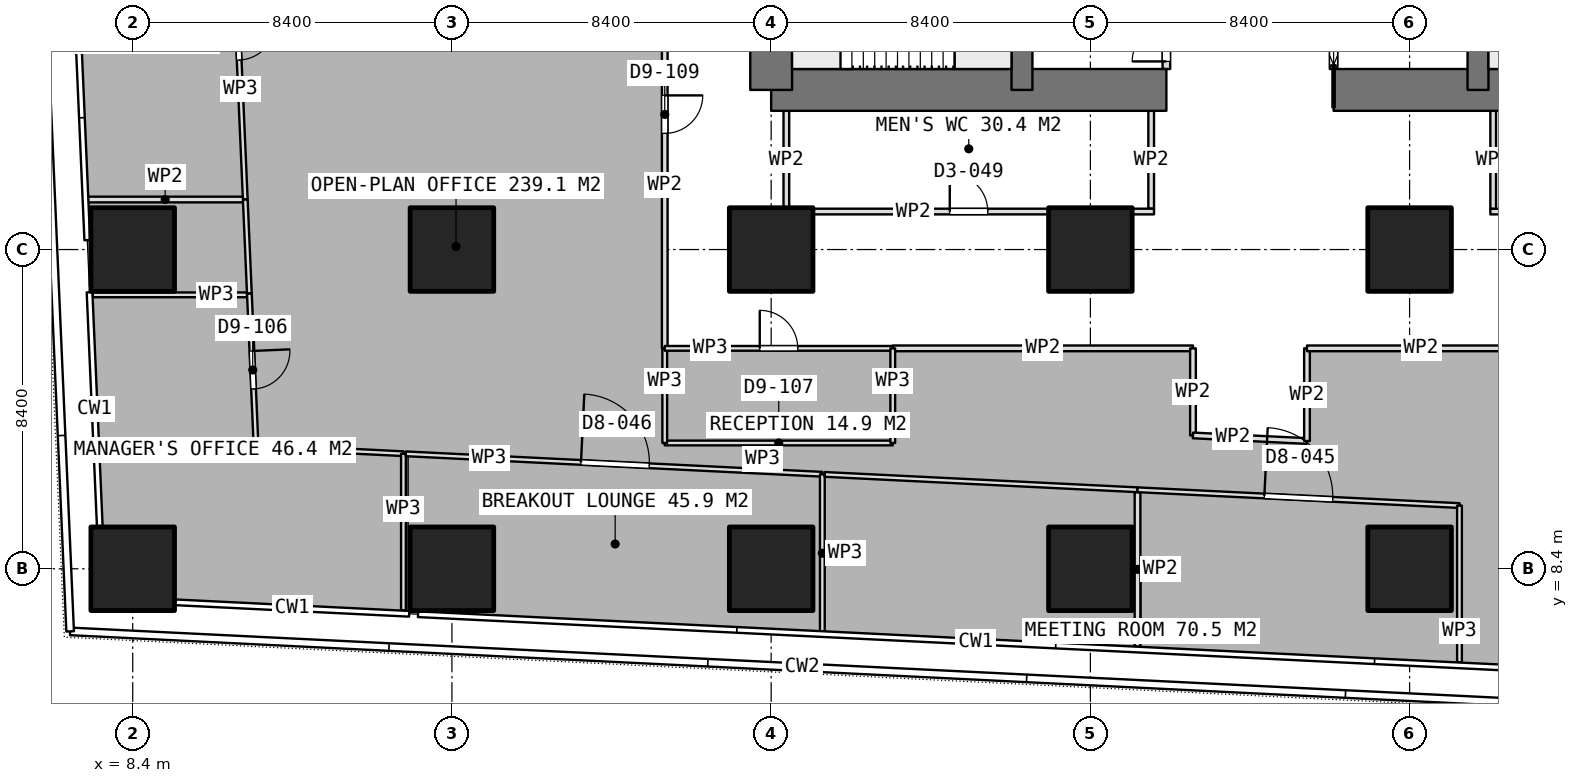
"""IFC4 building model, lengths in metres.
Left out: names, types, materials, properties, quantities, classifications, styles, units other than length and angle.
Written with IfcOpenShell. Run it as: python <this file> out.ifc"""

import sys

from ifc_helpers import new_model, si_unit, direction, frame, frame_2d, origin, origin_2d, place, context, subcontext, project, spatial, rectangle, extrude, element, fill, save


model = new_model("IFC4")
c1 = context("Model", 3, precision=1e-05, world=origin(), true_north=direction((0.0, 1.0)))
c2 = subcontext(c1, "Body", "Model", "MODEL_VIEW")
j1 = project(units=[si_unit("LENGTHUNIT", "METRE"), si_unit("PLANEANGLEUNIT", "RADIAN")], contexts=[c1])
p1 = place(None, origin())
s1 = spatial("IfcSite", under=j1, at=p1, CompositionType="ELEMENT")
p2 = place(p1, origin())
s2 = spatial("IfcBuilding", under=s1, at=p2, CompositionType="ELEMENT")
p3 = place(p2, frame((0.0, 0.0, 44.15)))
s3 = spatial("IfcBuildingStorey", under=s2, at=p3, CompositionType="ELEMENT", Elevation=44.15)
p4 = place(p3, frame((25.2, 21.0, 0.0), z_axis=(0.0, 0.0, 1.0), x_axis=(1.0, 0.0, 0.0)))
e1 = element("IfcWall", 1, at=p4, inside=s3, PredefinedType="SHEAR", context=c2, shape_type="SweptSolid", body=[
    extrude(rectangle(XDim=10.4, YDim=1.1, at=frame_2d((5.2, 0.0))), origin(), (0.0, 0.0, 1.0), 3.75),
])
p5 = place(p3, frame((40.0, 21.0, 0.0), z_axis=(0.0, 0.0, 1.0), x_axis=(1.0, 0.0, 0.0)))
e2 = element("IfcWall", 2, at=p5, inside=s3, PredefinedType="SHEAR", context=c2, shape_type="SweptSolid", body=[
    extrude(rectangle(XDim=10.4, YDim=1.1, at=frame_2d((5.2, 0.0))), origin(), (0.0, 0.0, 1.0), 3.75),
])
p6 = place(p3, frame((25.2, 21.0, 0.0), z_axis=(0.0, 0.0, 1.0), x_axis=(0.0, 1.0, 0.0)))
e3 = element("IfcWall", 3, at=p6, inside=s3, PredefinedType="SHEAR", context=c2, shape_type="SweptSolid", body=[
    extrude(rectangle(XDim=25.2, YDim=1.1, at=frame_2d((12.6, 0.0))), origin(), (0.0, 0.0, 1.0), 3.75),
])
p7 = place(p6, frame((7.8, 0.0, 0.0)))
e4 = element("IfcOpeningElement", 4, at=p7, cuts=e3, PredefinedType="OPENING", context=c2, shape_type="SweptSolid", body=[
    extrude(rectangle(XDim=1.2, YDim=2.1, at=frame_2d((0.6, 1.05))), frame((0.0, 0.56, 0.0), z_axis=(0.0, -1.0, 0.0), x_axis=(1.0, 0.0, 0.0)), (0.0, 0.0, 1.0), 1.12),
])
p8 = place(p6, frame((14.25, 0.0, 0.0)))
e5 = element("IfcOpeningElement", 5, at=p8, cuts=e3, PredefinedType="OPENING", context=c2, shape_type="SweptSolid", body=[
    extrude(rectangle(XDim=0.9, YDim=2.1, at=frame_2d((0.45, 1.05))), frame((0.0, 0.56, 0.0), z_axis=(0.0, -1.0, 0.0), x_axis=(1.0, 0.0, 0.0)), (0.0, 0.0, 1.0), 1.12),
])
p9 = place(p6, frame((16.85, 0.0, 0.0)))
e6 = element("IfcOpeningElement", 6, at=p9, cuts=e3, PredefinedType="OPENING", context=c2, shape_type="SweptSolid", body=[
    extrude(rectangle(XDim=0.9, YDim=2.1, at=frame_2d((0.45, 1.05))), frame((0.0, 0.56, 0.0), z_axis=(0.0, -1.0, 0.0), x_axis=(1.0, 0.0, 0.0)), (0.0, 0.0, 1.0), 1.12),
])
p10 = place(p6, frame((19.075, 0.0, 0.0)))
e7 = element("IfcOpeningElement", 7, at=p10, cuts=e3, PredefinedType="OPENING", context=c2, shape_type="SweptSolid", body=[
    extrude(rectangle(XDim=1.2, YDim=2.1, at=frame_2d((0.6, 1.05))), frame((0.0, 0.56, 0.0), z_axis=(0.0, -1.0, 0.0), x_axis=(1.0, 0.0, 0.0)), (0.0, 0.0, 1.0), 1.12),
])
for number, where, z_axis, x_axis in (
    (8, (31.8, 21.0, 0.0), (0.0, 0.0, 1.0), (0.0, 1.0, 0.0)),
    (9, (43.8, 21.0, 0.0), (0.0, 0.0, 1.0), (0.0, 1.0, 0.0)),
):
    element("IfcWall", number, at=place(p3, frame(where, z_axis=z_axis, x_axis=x_axis)), inside=s3, PredefinedType="SHEAR", context=c2, shape_type="SweptSolid", body=[
        extrude(rectangle(XDim=25.2, YDim=0.55, at=frame_2d((12.6, 0.0))), origin(), (0.0, 0.0, 1.0), 3.75),
    ])
for number, where, z_axis, x_axis in (
    (10, (8.4, 8.4, 0.0), (0.0, 0.0, 1.0), (1.0, 0.0, 0.0)),
    (11, (8.4, 16.8, 0.0), (0.0, 0.0, 1.0), (1.0, 0.0, 0.0)),
    (12, (16.8, 8.4, 0.0), (0.0, 0.0, 1.0), (1.0, 0.0, 0.0)),
    (13, (16.8, 16.8, 0.0), (0.0, 0.0, 1.0), (1.0, 0.0, 0.0)),
    (14, (25.2, 8.4, 0.0), (0.0, 0.0, 1.0), (1.0, 0.0, 0.0)),
    (15, (25.2, 16.8, 0.0), (0.0, 0.0, 1.0), (1.0, 0.0, 0.0)),
    (16, (33.6, 8.4, 0.0), (0.0, 0.0, 1.0), (1.0, 0.0, 0.0)),
    (17, (33.6, 16.8, 0.0), (0.0, 0.0, 1.0), (1.0, 0.0, 0.0)),
    (18, (42.0, 8.4, 0.0), (0.0, 0.0, 1.0), (1.0, 0.0, 0.0)),
    (19, (42.0, 16.8, 0.0), (0.0, 0.0, 1.0), (1.0, 0.0, 0.0)),
):
    element("IfcColumn", number, at=place(p3, frame(where, z_axis=z_axis, x_axis=x_axis)), inside=s3, PredefinedType="COLUMN", context=c2, shape_type="SweptSolid", body=[
        extrude(rectangle(XDim=2.2, YDim=2.2, at=origin_2d()), origin(), (0.0, 0.0, 1.0), 3.75),
    ])
p11 = place(p3, frame((40.0, 21.55, 0.0), z_axis=(0.0, 0.0, 1.0), x_axis=(0.0, 1.0, 0.0)))
e20 = element("IfcWall", 20, at=p11, inside=s3, PredefinedType="PARTITIONING", context=c2, shape_type="SweptSolid", body=[
    extrude(rectangle(XDim=1.575, YDim=0.2, at=frame_2d((0.788, 0.0))), origin(), (0.0, 0.0, 1.0), 3.5),
])
p12 = place(p11, frame((0.1, 0.0, 0.0)))
e21 = element("IfcOpeningElement", 21, at=p12, cuts=e20, PredefinedType="OPENING", context=c2, shape_type="SweptSolid", body=[
    extrude(rectangle(XDim=1.1, YDim=2.1, at=frame_2d((0.55, 1.05))), frame((0.0, 0.11, 0.0), z_axis=(0.0, -1.0, 0.0), x_axis=(1.0, 0.0, 0.0)), (0.0, 0.0, 1.0), 0.22),
])
p13 = place(p3, frame((35.6, 21.55, 0.0), z_axis=(0.0, 0.0, 1.0), x_axis=(0.0, 1.0, 0.0)))
e22 = element("IfcWall", 22, at=p13, inside=s3, PredefinedType="PARTITIONING", context=c2, shape_type="SweptSolid", body=[
    extrude(rectangle(XDim=1.575, YDim=0.2, at=frame_2d((0.788, 0.0))), origin(), (0.0, 0.0, 1.0), 3.5),
])
p14 = place(p13, frame((0.2, 0.0, 0.0)))
e23 = element("IfcOpeningElement", 23, at=p14, cuts=e22, PredefinedType="OPENING", context=c2, shape_type="SweptSolid", body=[
    extrude(rectangle(XDim=0.9, YDim=2.1, at=frame_2d((0.45, 1.05))), frame((0.0, 0.11, 0.0), z_axis=(0.0, -1.0, 0.0), x_axis=(1.0, 0.0, 0.0)), (0.0, 0.0, 1.0), 0.22),
])
p15 = place(p3, frame((25.525, 17.8, 0.0), z_axis=(0.0, 0.0, 1.0), x_axis=(1.0, 0.0, 0.0)))
e24 = element("IfcWall", 24, at=p15, inside=s3, PredefinedType="PARTITIONING", context=c2, shape_type="SweptSolid", body=[
    extrude(rectangle(XDim=9.75, YDim=0.15, at=frame_2d((4.875, 0.0))), origin(), (0.0, 0.0, 1.0), 3.5),
])
p16 = place(p15, frame((4.375, 0.0, 0.0)))
e25 = element("IfcOpeningElement", 25, at=p16, cuts=e24, PredefinedType="OPENING", context=c2, shape_type="SweptSolid", body=[
    extrude(rectangle(XDim=1.0, YDim=2.1, at=frame_2d((0.5, 1.05))), frame((0.0, 0.085, 0.0), z_axis=(0.0, -1.0, 0.0), x_axis=(1.0, 0.0, 0.0)), (0.0, 0.0, 1.0), 0.17),
])
for number, where, z_axis, x_axis in (
    (26, (25.6, 17.875, 0.0), (0.0, 0.0, 1.0), (0.0, 1.0, 0.0)),
    (27, (35.2, 17.875, 0.0), (0.0, 0.0, 1.0), (0.0, 1.0, 0.0)),
):
    element("IfcWall", number, at=place(p3, frame(where, z_axis=z_axis, x_axis=x_axis)), inside=s3, PredefinedType="PARTITIONING", context=c2, shape_type="SweptSolid", body=[
        extrude(rectangle(XDim=2.575, YDim=0.15, at=frame_2d((1.288, 0.0))), origin(), (0.0, 0.0, 1.0), 3.5),
    ])
p17 = place(p3, frame((44.125, 17.8, 0.0), z_axis=(0.0, 0.0, 1.0), x_axis=(1.0, 0.0, 0.0)))
e28 = element("IfcWall", 28, at=p17, inside=s3, PredefinedType="PARTITIONING", context=c2, shape_type="SweptSolid", body=[
    extrude(rectangle(XDim=5.95, YDim=0.15, at=frame_2d((2.975, 0.0))), origin(), (0.0, 0.0, 1.0), 3.5),
])
p18 = place(p17, frame((2.475, 0.0, 0.0)))
e29 = element("IfcOpeningElement", 29, at=p18, cuts=e28, PredefinedType="OPENING", context=c2, shape_type="SweptSolid", body=[
    extrude(rectangle(XDim=1.0, YDim=2.1, at=frame_2d((0.5, 1.05))), frame((0.0, 0.085, 0.0), z_axis=(0.0, -1.0, 0.0), x_axis=(1.0, 0.0, 0.0)), (0.0, 0.0, 1.0), 0.17),
])
p19 = place(p3, frame((44.2, 17.875, 0.0), z_axis=(0.0, 0.0, 1.0), x_axis=(0.0, 1.0, 0.0)))
e30 = element("IfcWall", 30, at=p19, inside=s3, PredefinedType="PARTITIONING", context=c2, shape_type="SweptSolid", body=[
    extrude(rectangle(XDim=2.575, YDim=0.15, at=frame_2d((1.288, 0.0))), origin(), (0.0, 0.0, 1.0), 3.5),
])
p20 = place(p3, frame((10.997, 26.449, 0.0), z_axis=(0.0, 0.0, 1.0), x_axis=(0.043768823127, -0.999041685878, 0.0)))
e31 = element("IfcWall", 31, at=p20, inside=s3, PredefinedType="PARTITIONING", context=c2, shape_type="SweptSolid", body=[
    extrude(rectangle(XDim=8.339, YDim=0.125, at=frame_2d((4.169, 0.0))), origin(), (0.0, 0.0, 1.0), 3.5),
])
p21 = place(p20, frame((3.669, 0.0, 0.0)))
e32 = element("IfcOpeningElement", 32, at=p21, cuts=e31, PredefinedType="OPENING", context=c2, shape_type="SweptSolid", body=[
    extrude(rectangle(XDim=1.0, YDim=2.1, at=frame_2d((0.5, 1.05))), frame((0.0, 0.073, 0.0), z_axis=(0.0, -1.0, 0.0), x_axis=(1.0, 0.0, 0.0)), (0.0, 0.0, 1.0), 0.145),
])
p22 = place(p3, frame((11.362, 18.118, 0.0), z_axis=(0.0, 0.0, 1.0), x_axis=(0.043578417469, -0.999050009525, 0.0)))
e33 = element("IfcWall", 33, at=p22, inside=s3, PredefinedType="PARTITIONING", context=c2, shape_type="SweptSolid", body=[
    extrude(rectangle(XDim=2.476, YDim=0.125, at=frame_2d((1.238, 0.0))), origin(), (0.0, 0.0, 1.0), 3.5),
])
p23 = place(p3, frame((11.409, 15.608, 0.0), z_axis=(0.0, 0.0, 1.0), x_axis=(-1.0, 0.0, 0.0)))
e34 = element("IfcWall", 34, at=p23, inside=s3, PredefinedType="PARTITIONING", context=c2, shape_type="SweptSolid", body=[
    extrude(rectangle(XDim=4.062, YDim=0.125, at=frame_2d((2.031, 0.0))), origin(), (0.0, 0.0, 1.0), 3.5),
])
p24 = place(p3, frame((11.47, 15.643, 0.0), z_axis=(0.0, 0.0, 1.0), x_axis=(0.043689667834, -0.999045150594, 0.0)))
e35 = element("IfcWall", 35, at=p24, inside=s3, PredefinedType="PARTITIONING", context=c2, shape_type="SweptSolid", body=[
    extrude(rectangle(XDim=4.029, YDim=0.125, at=frame_2d((2.015, 0.0))), origin(), (0.0, 0.0, 1.0), 3.5),
])
p25 = place(p24, frame((1.514, 0.0, 0.0)))
e36 = element("IfcOpeningElement", 36, at=p25, cuts=e35, PredefinedType="OPENING", context=c2, shape_type="SweptSolid", body=[
    extrude(rectangle(XDim=1.0, YDim=2.1, at=frame_2d((0.5, 1.05))), frame((0.0, 0.073, 0.0), z_axis=(0.0, -1.0, 0.0), x_axis=(1.0, 0.0, 0.0)), (0.0, 0.0, 1.0), 0.145),
])
p26 = place(p3, frame((11.646, 11.618, 0.0), z_axis=(0.0, 0.0, 1.0), x_axis=(0.998802628605, -0.048921458389, 0.0)))
e37 = element("IfcWall", 37, at=p26, inside=s3, PredefinedType="PARTITIONING", context=c2, shape_type="SweptSolid", body=[
    extrude(rectangle(XDim=3.883, YDim=0.125, at=frame_2d((1.941, 0.0))), origin(), (0.0, 0.0, 1.0), 3.5),
])
p27 = place(p3, frame((15.524, 11.428, 0.0), z_axis=(0.0, 0.0, 1.0), x_axis=(0.0, -1.0, 0.0)))
e38 = element("IfcWall", 38, at=p27, inside=s3, PredefinedType="PARTITIONING", context=c2, shape_type="SweptSolid", body=[
    extrude(rectangle(XDim=4.125, YDim=0.125, at=frame_2d((2.062, 0.0))), origin(), (0.0, 0.0, 1.0), 3.5),
])
p28 = place(p3, frame((15.586, 11.425, 0.0), z_axis=(0.0, 0.0, 1.0), x_axis=(0.998797252482, -0.049031096609, 0.0)))
e39 = element("IfcWall", 39, at=p28, inside=s3, PredefinedType="PARTITIONING", context=c2, shape_type="SweptSolid", body=[
    extrude(rectangle(XDim=10.974, YDim=0.125, at=frame_2d((5.487, 0.0))), origin(), (0.0, 0.0, 1.0), 3.5),
])
p29 = place(p28, frame((4.615, 0.0, 0.0)))
e40 = element("IfcOpeningElement", 40, at=p29, cuts=e39, PredefinedType="OPENING", context=c2, shape_type="SweptSolid", body=[
    extrude(rectangle(XDim=1.8, YDim=2.1, at=frame_2d((0.9, 1.05))), frame((0.0, 0.073, 0.0), z_axis=(0.0, -1.0, 0.0), x_axis=(1.0, 0.0, 0.0)), (0.0, 0.0, 1.0), 0.145),
])
p30 = place(p3, frame((26.547, 10.887, 0.0), z_axis=(0.0, 0.0, 1.0), x_axis=(0.0, -1.0, 0.0)))
e41 = element("IfcWall", 41, at=p30, inside=s3, PredefinedType="PARTITIONING", context=c2, shape_type="SweptSolid", body=[
    extrude(rectangle(XDim=4.155, YDim=0.125, at=frame_2d((2.078, 0.0))), origin(), (0.0, 0.0, 1.0), 3.5),
])
p31 = place(p3, frame((26.61, 10.883, 0.0), z_axis=(0.0, 0.0, 1.0), x_axis=(0.998797003779, -0.0490361626, 0.0)))
e42 = element("IfcWall", 42, at=p31, inside=s3, PredefinedType="PARTITIONING", context=c2, shape_type="SweptSolid", body=[
    extrude(rectangle(XDim=8.24, YDim=0.125, at=frame_2d((4.12, 0.0))), origin(), (0.0, 0.0, 1.0), 3.5),
])
p32 = place(p3, frame((34.84, 10.479, 0.0), z_axis=(0.0, 0.0, 1.0), x_axis=(0.998796791982, -0.049040476402, 0.0)))
e43 = element("IfcWall", 43, at=p32, inside=s3, PredefinedType="PARTITIONING", context=c2, shape_type="SweptSolid", body=[
    extrude(rectangle(XDim=8.483, YDim=0.125, at=frame_2d((4.242, 0.0))), origin(), (0.0, 0.0, 1.0), 3.5),
])
p33 = place(p32, frame((3.342, 0.0, 0.0)))
e44 = element("IfcOpeningElement", 44, at=p33, cuts=e43, PredefinedType="OPENING", context=c2, shape_type="SweptSolid", body=[
    extrude(rectangle(XDim=1.8, YDim=2.1, at=frame_2d((0.9, 1.05))), frame((0.0, 0.073, 0.0), z_axis=(0.0, -1.0, 0.0), x_axis=(1.0, 0.0, 0.0)), (0.0, 0.0, 1.0), 0.145),
])
p34 = place(p3, frame((43.313, 10.063, 0.0), z_axis=(0.0, 0.0, 1.0), x_axis=(0.0, -1.0, 0.0)))
e45 = element("IfcWall", 45, at=p34, inside=s3, PredefinedType="PARTITIONING", context=c2, shape_type="SweptSolid", body=[
    extrude(rectangle(XDim=4.125, YDim=0.125, at=frame_2d((2.062, 0.0))), origin(), (0.0, 0.0, 1.0), 3.5),
])
p35 = place(p3, frame((28.4, 11.71, 0.0), z_axis=(0.0, 0.0, 1.0), x_axis=(-1.0, 0.0, 0.0)))
e46 = element("IfcWall", 46, at=p35, inside=s3, PredefinedType="PARTITIONING", context=c2, shape_type="SweptSolid", body=[
    extrude(rectangle(XDim=6.0, YDim=0.125, at=frame_2d((3.0, 0.0))), origin(), (0.0, 0.0, 1.0), 3.5),
])
p36 = place(p3, frame((22.4, 11.71, 0.0), z_axis=(0.0, 0.0, 1.0), x_axis=(0.0, 1.0, 0.0)))
e47 = element("IfcWall", 47, at=p36, inside=s3, PredefinedType="PARTITIONING", context=c2, shape_type="SweptSolid", body=[
    extrude(rectangle(XDim=2.49, YDim=0.125, at=frame_2d((1.245, 0.0))), origin(), (0.0, 0.0, 1.0), 3.5),
])
p37 = place(p3, frame((22.4, 14.2, 0.0), z_axis=(0.0, 0.0, 1.0), x_axis=(1.0, 0.0, 0.0)))
e48 = element("IfcWall", 48, at=p37, inside=s3, PredefinedType="PARTITIONING", context=c2, shape_type="SweptSolid", body=[
    extrude(rectangle(XDim=6.0, YDim=0.125, at=frame_2d((3.0, 0.0))), origin(), (0.0, 0.0, 1.0), 3.5),
])
p38 = place(p37, frame((2.5, 0.0, 0.0)))
e49 = element("IfcOpeningElement", 49, at=p38, cuts=e48, PredefinedType="OPENING", context=c2, shape_type="SweptSolid", body=[
    extrude(rectangle(XDim=1.0, YDim=2.1, at=frame_2d((0.5, 1.05))), frame((0.0, 0.073, 0.0), z_axis=(0.0, -1.0, 0.0), x_axis=(1.0, 0.0, 0.0)), (0.0, 0.0, 1.0), 0.145),
])
p39 = place(p3, frame((28.4, 14.2, 0.0), z_axis=(0.0, 0.0, 1.0), x_axis=(0.0, -1.0, 0.0)))
e50 = element("IfcWall", 50, at=p39, inside=s3, PredefinedType="PARTITIONING", context=c2, shape_type="SweptSolid", body=[
    extrude(rectangle(XDim=2.49, YDim=0.125, at=frame_2d((1.245, 0.0))), origin(), (0.0, 0.0, 1.0), 3.5),
])
p40 = place(p3, frame((11.3, 18.116, 0.0), z_axis=(0.0, 0.0, 1.0), x_axis=(-1.0, 0.0, 0.0)))
e51 = element("IfcWall", 51, at=p40, inside=s3, PredefinedType="PARTITIONING", context=c2, shape_type="SweptSolid", body=[
    extrude(rectangle(XDim=4.092, YDim=0.15, at=frame_2d((2.046, 0.0))), origin(), (0.0, 0.0, 1.0), 3.5),
])
p41 = place(p3, frame((22.4, 26.512, 0.0), z_axis=(0.0, 0.0, 1.0), x_axis=(0.0, -1.0, 0.0)))
e52 = element("IfcWall", 52, at=p41, inside=s3, PredefinedType="PARTITIONING", context=c2, shape_type="SweptSolid", body=[
    extrude(rectangle(XDim=12.312, YDim=0.15, at=frame_2d((6.156, 0.0))), origin(), (0.0, 0.0, 1.0), 3.5),
])
p42 = place(p41, frame((5.656, 0.0, 0.0)))
e53 = element("IfcOpeningElement", 53, at=p42, cuts=e52, PredefinedType="OPENING", context=c2, shape_type="SweptSolid", body=[
    extrude(rectangle(XDim=1.0, YDim=2.1, at=frame_2d((0.5, 1.05))), frame((0.0, 0.085, 0.0), z_axis=(0.0, -1.0, 0.0), x_axis=(1.0, 0.0, 0.0)), (0.0, 0.0, 1.0), 0.17),
])
p43 = place(p3, frame((28.4, 14.2, 0.0), z_axis=(0.0, 0.0, 1.0), x_axis=(1.0, 0.0, 0.0)))
e54 = element("IfcWall", 54, at=p43, inside=s3, PredefinedType="PARTITIONING", context=c2, shape_type="SweptSolid", body=[
    extrude(rectangle(XDim=7.9, YDim=0.15, at=frame_2d((3.95, 0.0))), origin(), (0.0, 0.0, 1.0), 3.5),
])
p44 = place(p3, frame((36.3, 14.2, 0.0), z_axis=(0.0, 0.0, 1.0), x_axis=(0.0, -1.0, 0.0)))
e55 = element("IfcWall", 55, at=p44, inside=s3, PredefinedType="PARTITIONING", context=c2, shape_type="SweptSolid", body=[
    extrude(rectangle(XDim=2.291, YDim=0.15, at=frame_2d((1.146, 0.0))), origin(), (0.0, 0.0, 1.0), 3.5),
])
p45 = place(p3, frame((36.3, 11.909, 0.0), z_axis=(0.0, 0.0, 1.0), x_axis=(0.998802102454, -0.048932199355, 0.0)))
e56 = element("IfcWall", 56, at=p45, inside=s3, PredefinedType="PARTITIONING", context=c2, shape_type="SweptSolid", body=[
    extrude(rectangle(XDim=3.004, YDim=0.15, at=frame_2d((1.502, 0.0))), origin(), (0.0, 0.0, 1.0), 3.5),
])
p46 = place(p3, frame((39.3, 11.762, 0.0), z_axis=(0.0, 0.0, 1.0), x_axis=(0.0, 1.0, 0.0)))
e57 = element("IfcWall", 57, at=p46, inside=s3, PredefinedType="PARTITIONING", context=c2, shape_type="SweptSolid", body=[
    extrude(rectangle(XDim=2.438, YDim=0.15, at=frame_2d((1.219, 0.0))), origin(), (0.0, 0.0, 1.0), 3.5),
])
p47 = place(p3, frame((39.3, 14.2, 0.0), z_axis=(0.0, 0.0, 1.0), x_axis=(1.0, 0.0, 0.0)))
e58 = element("IfcWall", 58, at=p47, inside=s3, PredefinedType="PARTITIONING", context=c2, shape_type="SweptSolid", body=[
    extrude(rectangle(XDim=6.004, YDim=0.15, at=frame_2d((3.002, 0.0))), origin(), (0.0, 0.0, 1.0), 3.5),
])
p48 = place(p3, frame((34.841, 10.416, 0.0), z_axis=(0.0, 0.0, 1.0), x_axis=(0.0, -1.0, 0.0)))
e59 = element("IfcWall", 59, at=p48, inside=s3, PredefinedType="PARTITIONING", context=c2, shape_type="SweptSolid", body=[
    extrude(rectangle(XDim=4.062, YDim=0.15, at=frame_2d((2.031, 0.0))), origin(), (0.0, 0.0, 1.0), 3.5),
])
p49 = place(p12, origin())
e60 = element("IfcDoor", 60, at=p49, inside=s3, OperationType="SLIDING_TO_LEFT", PredefinedType="DOOR", context=c2, shape_type="SweptSolid", body=[
    extrude(rectangle(XDim=1.1, YDim=2.1, at=frame_2d((0.55, 1.05))), frame((0.0, 0.025, 0.0), z_axis=(0.0, -1.0, 0.0), x_axis=(1.0, 0.0, 0.0)), (0.0, 0.0, 1.0), 0.05),
])
fill(e21, e60)
p50 = place(p14, origin())
e61 = element("IfcDoor", 61, at=p50, inside=s3, OperationType="SINGLE_SWING_LEFT", PredefinedType="DOOR", context=c2, shape_type="SweptSolid", body=[
    extrude(rectangle(XDim=0.9, YDim=2.1, at=frame_2d((0.45, 1.05))), frame((0.0, 0.025, 0.0), z_axis=(0.0, -1.0, 0.0), x_axis=(1.0, 0.0, 0.0)), (0.0, 0.0, 1.0), 0.05),
])
fill(e23, e61)
p51 = place(p16, origin())
e62 = element("IfcDoor", 62, at=p51, inside=s3, OperationType="SINGLE_SWING_LEFT", PredefinedType="DOOR", context=c2, shape_type="SweptSolid", body=[
    extrude(rectangle(XDim=1.0, YDim=2.1, at=frame_2d((0.5, 1.05))), frame((0.0, 0.025, 0.0), z_axis=(0.0, -1.0, 0.0), x_axis=(1.0, 0.0, 0.0)), (0.0, 0.0, 1.0), 0.05),
])
fill(e25, e62)
p52 = place(p21, origin())
e63 = element("IfcDoor", 63, at=p52, inside=s3, OperationType="SINGLE_SWING_LEFT", PredefinedType="DOOR", context=c2, shape_type="SweptSolid", body=[
    extrude(rectangle(XDim=1.0, YDim=2.1, at=frame_2d((0.5, 1.05))), frame((0.0, 0.025, 0.0), z_axis=(0.0, -1.0, 0.0), x_axis=(1.0, 0.0, 0.0)), (0.0, 0.0, 1.0), 0.05),
])
fill(e32, e63)
p53 = place(p25, origin())
e64 = element("IfcDoor", 64, at=p53, inside=s3, OperationType="SINGLE_SWING_LEFT", PredefinedType="DOOR", context=c2, shape_type="SweptSolid", body=[
    extrude(rectangle(XDim=1.0, YDim=2.1, at=frame_2d((0.5, 1.05))), frame((0.0, 0.025, 0.0), z_axis=(0.0, -1.0, 0.0), x_axis=(1.0, 0.0, 0.0)), (0.0, 0.0, 1.0), 0.05),
])
fill(e36, e64)
p54 = place(p29, origin())
e65 = element("IfcDoor", 65, at=p54, inside=s3, OperationType="DOUBLE_DOOR_SINGLE_SWING", PredefinedType="DOOR", context=c2, shape_type="SweptSolid", body=[
    extrude(rectangle(XDim=1.8, YDim=2.1, at=frame_2d((0.9, 1.05))), frame((0.0, 0.025, 0.0), z_axis=(0.0, -1.0, 0.0), x_axis=(1.0, 0.0, 0.0)), (0.0, 0.0, 1.0), 0.05),
])
fill(e40, e65)
p55 = place(p33, origin())
e66 = element("IfcDoor", 66, at=p55, inside=s3, OperationType="DOUBLE_DOOR_SINGLE_SWING", PredefinedType="DOOR", context=c2, shape_type="SweptSolid", body=[
    extrude(rectangle(XDim=1.8, YDim=2.1, at=frame_2d((0.9, 1.05))), frame((0.0, 0.025, 0.0), z_axis=(0.0, -1.0, 0.0), x_axis=(1.0, 0.0, 0.0)), (0.0, 0.0, 1.0), 0.05),
])
fill(e44, e66)
p56 = place(p38, origin())
e67 = element("IfcDoor", 67, at=p56, inside=s3, OperationType="SINGLE_SWING_LEFT", PredefinedType="DOOR", context=c2, shape_type="SweptSolid", body=[
    extrude(rectangle(XDim=1.0, YDim=2.1, at=frame_2d((0.5, 1.05))), frame((0.0, 0.025, 0.0), z_axis=(0.0, -1.0, 0.0), x_axis=(1.0, 0.0, 0.0)), (0.0, 0.0, 1.0), 0.05),
])
fill(e49, e67)
p57 = place(p42, origin())
e68 = element("IfcDoor", 68, at=p57, inside=s3, OperationType="SINGLE_SWING_LEFT", PredefinedType="DOOR", context=c2, shape_type="SweptSolid", body=[
    extrude(rectangle(XDim=1.0, YDim=2.1, at=frame_2d((0.5, 1.05))), frame((0.0, 0.025, 0.0), z_axis=(0.0, -1.0, 0.0), x_axis=(1.0, 0.0, 0.0)), (0.0, 0.0, 1.0), 0.05),
])
fill(e53, e68)
save(model, sys.argv[1])
